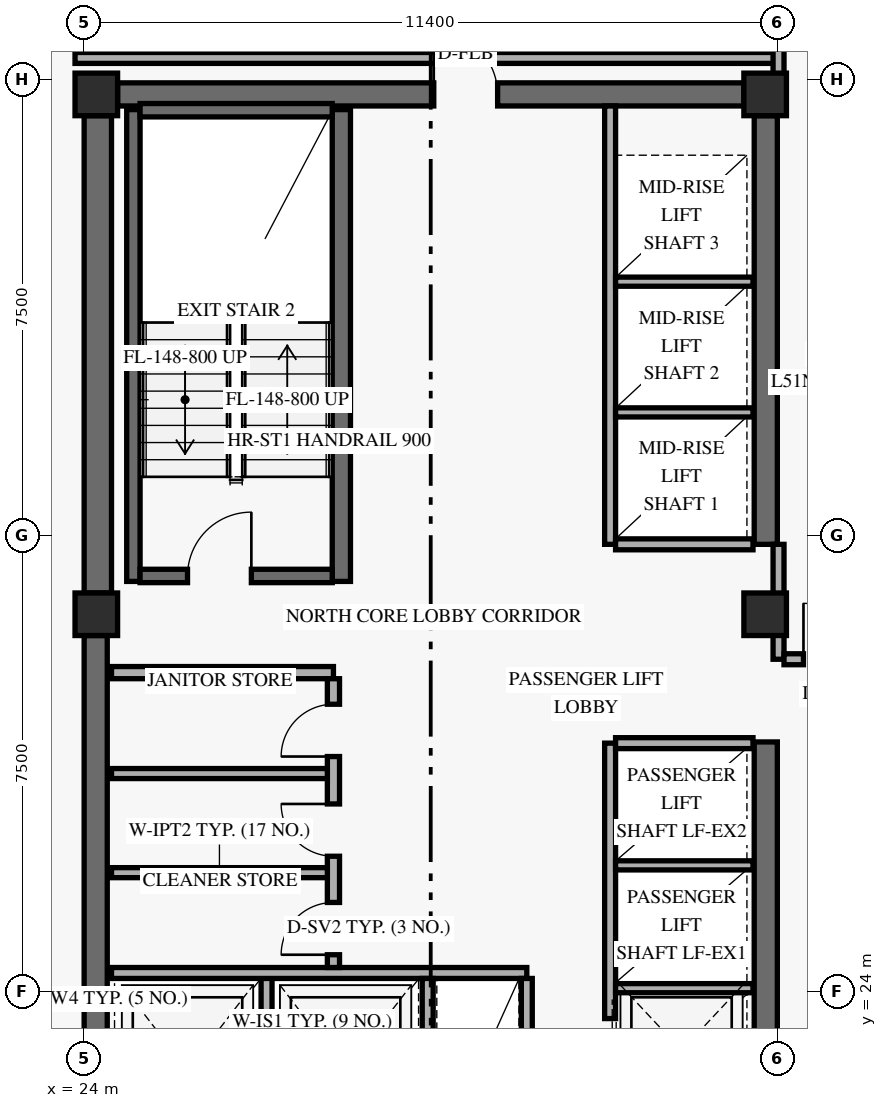
"""IFC4 building model, lengths in metres.
Left out: names, types, materials, properties, quantities, classifications, styles, units other than length and angle.
Written with IfcOpenShell. Run it as: python <this file> out.ifc"""

import sys

from ifc_helpers import new_model, si_unit, direction, frame, frame_2d, origin, origin_2d, place, context, subcontext, project, spatial, rectangle, extrude, element, fill, save


model = new_model("IFC4")
c1 = context("Model", 3, precision=1e-05, world=origin(), true_north=direction((0.0, 1.0)))
c2 = subcontext(c1, "Body", "Model", "MODEL_VIEW")
j1 = project(units=[si_unit("LENGTHUNIT", "METRE"), si_unit("PLANEANGLEUNIT", "RADIAN")], contexts=[c1])
p1 = place(None, origin())
s1 = spatial("IfcSite", under=j1, at=p1, CompositionType="ELEMENT")
p2 = place(p1, origin())
s2 = spatial("IfcBuilding", under=s1, at=p2, CompositionType="ELEMENT")
p3 = place(p2, frame((0.0, 0.0, 196.2)))
s3 = spatial("IfcBuildingStorey", under=s2, at=p3, CompositionType="ELEMENT", Elevation=196.2)
p4 = place(p3, frame((24.19, 17.9, 0.0), z_axis=(0.0, 0.0, 1.0), x_axis=(0.0, 1.0, 0.0)))
e1 = element("IfcWall", 1, at=p4, inside=s3, PredefinedType="SHEAR", context=c2, shape_type="SweptSolid", body=[
    extrude(rectangle(XDim=11.95, YDim=0.38, at=frame_2d((5.975, 0.0))), origin(), (0.0, 0.0, 1.0), 2.688),
])
p5 = place(p3, frame((24.225, 30.55, 0.0), z_axis=(0.0, 0.0, 1.0), x_axis=(0.0, 1.0, 0.0)))
e2 = element("IfcWall", 2, at=p5, inside=s3, PredefinedType="SHEAR", context=c2, shape_type="SweptSolid", body=[
    extrude(rectangle(XDim=7.85, YDim=0.45, at=frame_2d((3.925, 0.0))), origin(), (0.0, 0.0, 1.0), 2.688),
])
p6 = place(p3, frame((35.21, 17.9, 0.0), z_axis=(0.0, 0.0, 1.0), x_axis=(0.0, 1.0, 0.0)))
e3 = element("IfcWall", 3, at=p6, inside=s3, PredefinedType="SHEAR", context=c2, shape_type="SweptSolid", body=[
    extrude(rectangle(XDim=10.2, YDim=0.38, at=frame_2d((5.1, 0.0))), origin(), (0.0, 0.0, 1.0), 2.688),
])
p7 = place(p3, frame((35.21, 31.35, 0.0), z_axis=(0.0, 0.0, 1.0), x_axis=(0.0, 1.0, 0.0)))
e4 = element("IfcWall", 4, at=p7, inside=s3, PredefinedType="SHEAR", context=c2, shape_type="SweptSolid", body=[
    extrude(rectangle(XDim=7.05, YDim=0.38, at=frame_2d((3.525, 0.0))), origin(), (0.0, 0.0, 1.0), 2.688),
])
p8 = place(p3, frame((24.55, 38.75, 0.0), z_axis=(0.0, 0.0, 1.0), x_axis=(1.0, 0.0, 0.0)))
e5 = element("IfcWall", 5, at=p8, inside=s3, PredefinedType="SHEAR", context=c2, shape_type="SweptSolid", body=[
    extrude(rectangle(XDim=10.3, YDim=0.38, at=frame_2d((5.15, 0.0))), origin(), (0.0, 0.0, 1.0), 3.3),
])
p9 = place(p8, frame((5.2, 0.0, 0.0)))
e6 = element("IfcOpeningElement", 6, at=p9, cuts=e5, PredefinedType="OPENING", context=c2, shape_type="SweptSolid", body=[
    extrude(rectangle(XDim=1.05, YDim=2.15, at=frame_2d((0.525, 1.075))), frame((0.0, 0.2, 0.0), z_axis=(0.0, -1.0, 0.0), x_axis=(1.0, 0.0, 0.0)), (0.0, 0.0, 1.0), 0.4),
])
p10 = place(p3, frame((24.81, 30.74, 0.0), z_axis=(0.0, 0.0, 1.0), x_axis=(0.0, 1.0, 0.0)))
e7 = element("IfcWall", 7, at=p10, inside=s3, PredefinedType="SHEAR", context=c2, shape_type="SweptSolid", body=[
    extrude(rectangle(XDim=7.76, YDim=0.22, at=frame_2d((3.88, 0.0))), origin(), (0.0, 0.0, 1.0), 3.3),
])
p11 = place(p3, frame((28.23, 30.74, 0.0), z_axis=(0.0, 0.0, 1.0), x_axis=(0.0, 1.0, 0.0)))
e8 = element("IfcWall", 8, at=p11, inside=s3, PredefinedType="SHEAR", context=c2, shape_type="SweptSolid", body=[
    extrude(rectangle(XDim=7.76, YDim=0.3, at=frame_2d((3.88, 0.0))), origin(), (0.0, 0.0, 1.0), 3.3),
])
p12 = place(p3, frame((24.92, 30.83, 0.0), z_axis=(0.0, 0.0, 1.0), x_axis=(1.0, 0.0, 0.0)))
e9 = element("IfcWall", 9, at=p12, inside=s3, PredefinedType="SHEAR", context=c2, shape_type="SweptSolid", body=[
    extrude(rectangle(XDim=3.16, YDim=0.22, at=frame_2d((1.58, 0.0))), origin(), (0.0, 0.0, 1.0), 3.3),
])
p13 = place(p12, frame((0.78, 0.0, 0.0)))
e10 = element("IfcOpeningElement", 10, at=p13, cuts=e9, PredefinedType="OPENING", context=c2, shape_type="SweptSolid", body=[
    extrude(rectangle(XDim=1.05, YDim=2.15, at=frame_2d((0.525, 1.075))), frame((0.0, 0.12, 0.0), z_axis=(0.0, -1.0, 0.0), x_axis=(1.0, 0.0, 0.0)), (0.0, 0.0, 1.0), 0.24),
])
p14 = place(p3, frame((24.92, 38.49, 0.0), z_axis=(0.0, 0.0, 1.0), x_axis=(1.0, 0.0, 0.0)))
e11 = element("IfcWall", 11, at=p14, inside=s3, PredefinedType="SHEAR", context=c2, shape_type="SweptSolid", body=[
    extrude(rectangle(XDim=3.16, YDim=0.22, at=frame_2d((1.58, 0.0))), origin(), (0.0, 0.0, 1.0), 3.3),
])
for number, where, z_axis, x_axis in (
    (12, (24.2, 30.2, 0.0), (0.0, 0.0, 1.0), (1.0, 0.0, 0.0)),
    (13, (24.2, 38.75, 0.0), (0.0, 0.0, 1.0), (1.0, 0.0, 0.0)),
    (14, (35.2, 30.2, 0.0), (0.0, 0.0, 1.0), (1.0, 0.0, 0.0)),
    (15, (35.2, 38.75, 0.0), (0.0, 0.0, 1.0), (1.0, 0.0, 0.0)),
):
    element("IfcColumn", number, at=place(p3, frame(where, z_axis=z_axis, x_axis=x_axis)), inside=s3, PredefinedType="COLUMN", context=c2, shape_type="SweptSolid", body=[
        extrude(rectangle(XDim=0.7, YDim=0.7, at=origin_2d()), origin(), (0.0, 0.0, 1.0), 3.6),
    ])
p15 = place(p3, frame((27.0, 21.19, 0.0), z_axis=(0.0, 0.0, 1.0), x_axis=(0.0, 1.0, 0.0)))
e16 = element("IfcWall", 16, at=p15, inside=s3, PredefinedType="STANDARD", context=c2, shape_type="SweptSolid", body=[
    extrude(rectangle(XDim=3.11, YDim=0.18, at=frame_2d((1.555, 0.0))), origin(), (0.0, 0.0, 1.0), 3.3),
])
p16 = place(p3, frame((24.45, 24.3, 0.0), z_axis=(0.0, 0.0, 1.0), x_axis=(1.0, 0.0, 0.0)))
e17 = element("IfcWall", 17, at=p16, inside=s3, PredefinedType="STANDARD", context=c2, shape_type="SweptSolid", body=[
    extrude(rectangle(XDim=6.83, YDim=0.18, at=frame_2d((3.415, 0.0))), origin(), (0.0, 0.0, 1.0), 3.3),
])
for number, where, z_axis, x_axis in (
    (18, (29.65, 21.19, 0.0), (0.0, 0.0, 1.0), (0.0, 1.0, 0.0)),
    (19, (31.28, 21.19, 0.0), (0.0, 0.0, 1.0), (0.0, 1.0, 0.0)),
):
    element("IfcWall", number, at=place(p3, frame(where, z_axis=z_axis, x_axis=x_axis)), inside=s3, PredefinedType="STANDARD", context=c2, shape_type="SweptSolid", body=[
        extrude(rectangle(XDim=3.02, YDim=0.18, at=frame_2d((1.51, 0.0))), origin(), (0.0, 0.0, 1.0), 3.3),
    ])
p17 = place(p3, frame((24.45, 29.24, 0.0), z_axis=(0.0, 0.0, 1.0), x_axis=(1.0, 0.0, 0.0)))
e20 = element("IfcWall", 20, at=p17, inside=s3, PredefinedType="STANDARD", context=c2, shape_type="SweptSolid", body=[
    extrude(rectangle(XDim=3.65, YDim=0.2, at=frame_2d((1.825, 0.0))), origin(), (0.0, 0.0, 1.0), 3.3),
])
p18 = place(p3, frame((28.1, 24.39, 0.0), z_axis=(0.0, 0.0, 1.0), x_axis=(0.0, 1.0, 0.0)))
e21 = element("IfcWall", 21, at=p18, inside=s3, PredefinedType="STANDARD", context=c2, shape_type="SweptSolid", body=[
    extrude(rectangle(XDim=4.75, YDim=0.2, at=frame_2d((2.375, 0.0))), origin(), (0.0, 0.0, 1.0), 3.3),
])
p19 = place(p18, frame((0.21, 0.0, 0.0)))
e22 = element("IfcOpeningElement", 22, at=p19, cuts=e21, PredefinedType="OPENING", context=c2, shape_type="SweptSolid", body=[
    extrude(rectangle(XDim=0.86, YDim=2.1, at=frame_2d((0.43, 1.05))), frame((0.0, 0.11, 0.0), z_axis=(0.0, -1.0, 0.0), x_axis=(1.0, 0.0, 0.0)), (0.0, 0.0, 1.0), 0.22),
])
p20 = place(p18, frame((1.83, 0.0, 0.0)))
e23 = element("IfcOpeningElement", 23, at=p20, cuts=e21, PredefinedType="OPENING", context=c2, shape_type="SweptSolid", body=[
    extrude(rectangle(XDim=0.86, YDim=2.1, at=frame_2d((0.43, 1.05))), frame((0.0, 0.11, 0.0), z_axis=(0.0, -1.0, 0.0), x_axis=(1.0, 0.0, 0.0)), (0.0, 0.0, 1.0), 0.22),
])
p21 = place(p18, frame((3.47, 0.0, 0.0)))
e24 = element("IfcOpeningElement", 24, at=p21, cuts=e21, PredefinedType="OPENING", context=c2, shape_type="SweptSolid", body=[
    extrude(rectangle(XDim=0.86, YDim=2.1, at=frame_2d((0.43, 1.05))), frame((0.0, 0.11, 0.0), z_axis=(0.0, -1.0, 0.0), x_axis=(1.0, 0.0, 0.0)), (0.0, 0.0, 1.0), 0.22),
])
for number, where, z_axis, x_axis in (
    (25, (24.45, 25.95, 0.0), (0.0, 0.0, 1.0), (1.0, 0.0, 0.0)),
    (26, (24.45, 27.58, 0.0), (0.0, 0.0, 1.0), (1.0, 0.0, 0.0)),
):
    element("IfcWall", number, at=place(p3, frame(where, z_axis=z_axis, x_axis=x_axis)), inside=s3, PredefinedType="PARTITIONING", context=c2, shape_type="SweptSolid", body=[
        extrude(rectangle(XDim=3.55, YDim=0.165, at=frame_2d((1.775, 0.0))), origin(), (0.0, 0.0, 1.0), 3.3),
    ])
p22 = place(p3, frame((32.65, 18.02, 0.0), z_axis=(0.0, 0.0, 1.0), x_axis=(0.0, 1.0, 0.0)))
e27 = element("IfcWall", 27, at=p22, inside=s3, PredefinedType="STANDARD", context=c2, shape_type="SweptSolid", body=[
    extrude(rectangle(XDim=10.06, YDim=0.18, at=frame_2d((5.03, 0.0))), origin(), (0.0, 0.0, 1.0), 3.3),
])
p23 = place(p22, frame((0.48, 0.0, 0.0)))
e28 = element("IfcOpeningElement", 28, at=p23, cuts=e27, PredefinedType="OPENING", context=c2, shape_type="SweptSolid", body=[
    extrude(rectangle(XDim=1.05, YDim=2.2, at=frame_2d((0.525, 1.1))), frame((0.0, 0.1, 0.0), z_axis=(0.0, -1.0, 0.0), x_axis=(1.0, 0.0, 0.0)), (0.0, 0.0, 1.0), 0.2),
])
p24 = place(p22, frame((2.48, 0.0, 0.0)))
e29 = element("IfcOpeningElement", 29, at=p24, cuts=e27, PredefinedType="OPENING", context=c2, shape_type="SweptSolid", body=[
    extrude(rectangle(XDim=1.05, YDim=2.2, at=frame_2d((0.525, 1.1))), frame((0.0, 0.1, 0.0), z_axis=(0.0, -1.0, 0.0), x_axis=(1.0, 0.0, 0.0)), (0.0, 0.0, 1.0), 0.2),
])
p25 = place(p22, frame((4.48, 0.0, 0.0)))
e30 = element("IfcOpeningElement", 30, at=p25, cuts=e27, PredefinedType="OPENING", context=c2, shape_type="SweptSolid", body=[
    extrude(rectangle(XDim=1.05, YDim=2.2, at=frame_2d((0.525, 1.1))), frame((0.0, 0.1, 0.0), z_axis=(0.0, -1.0, 0.0), x_axis=(1.0, 0.0, 0.0)), (0.0, 0.0, 1.0), 0.2),
])
p26 = place(p3, frame((32.74, 28.08, 0.0), z_axis=(0.0, 0.0, 1.0), x_axis=(1.0, 0.0, 0.0)))
e31 = element("IfcWall", 31, at=p26, inside=s3, PredefinedType="STANDARD", context=c2, shape_type="SweptSolid", body=[
    extrude(rectangle(XDim=2.26, YDim=0.18, at=frame_2d((1.13, 0.0))), origin(), (0.0, 0.0, 1.0), 3.3),
])
for number, where, z_axis, x_axis in (
    (32, (32.74, 24.05, 0.0), (0.0, 0.0, 1.0), (1.0, 0.0, 0.0)),
    (33, (32.74, 26.07, 0.0), (0.0, 0.0, 1.0), (1.0, 0.0, 0.0)),
):
    element("IfcWall", number, at=place(p3, frame(where, z_axis=z_axis, x_axis=x_axis)), inside=s3, PredefinedType="STANDARD", context=c2, shape_type="SweptSolid", body=[
        extrude(rectangle(XDim=2.26, YDim=0.15, at=frame_2d((1.13, 0.0))), origin(), (0.0, 0.0, 1.0), 3.3),
    ])
p27 = place(p3, frame((32.65, 31.35, 0.0), z_axis=(0.0, 0.0, 1.0), x_axis=(0.0, 1.0, 0.0)))
e34 = element("IfcWall", 34, at=p27, inside=s3, PredefinedType="STANDARD", context=c2, shape_type="SweptSolid", body=[
    extrude(rectangle(XDim=7.21, YDim=0.18, at=frame_2d((3.605, 0.0))), origin(), (0.0, 0.0, 1.0), 3.3),
])
p28 = place(p3, frame((32.74, 31.35, 0.0), z_axis=(0.0, 0.0, 1.0), x_axis=(1.0, 0.0, 0.0)))
e35 = element("IfcWall", 35, at=p28, inside=s3, PredefinedType="STANDARD", context=c2, shape_type="SweptSolid", body=[
    extrude(rectangle(XDim=2.26, YDim=0.18, at=frame_2d((1.13, 0.0))), origin(), (0.0, 0.0, 1.0), 3.3),
])
for number, where, z_axis, x_axis in (
    (36, (32.74, 33.52, 0.0), (0.0, 0.0, 1.0), (1.0, 0.0, 0.0)),
    (37, (32.74, 35.67, 0.0), (0.0, 0.0, 1.0), (1.0, 0.0, 0.0)),
):
    element("IfcWall", number, at=place(p3, frame(where, z_axis=z_axis, x_axis=x_axis)), inside=s3, PredefinedType="STANDARD", context=c2, shape_type="SweptSolid", body=[
        extrude(rectangle(XDim=2.26, YDim=0.15, at=frame_2d((1.13, 0.0))), origin(), (0.0, 0.0, 1.0), 3.3),
    ])
p29 = place(p3, frame((35.42, 29.46, 0.0), z_axis=(0.0, 0.0, 1.0), x_axis=(0.0, 1.0, 0.0)))
e38 = element("IfcWall", 38, at=p29, inside=s3, PredefinedType="STANDARD", context=c2, shape_type="SweptSolid", body=[
    extrude(rectangle(XDim=1.89, YDim=0.18, at=frame_2d((0.945, 0.0))), origin(), (0.0, 0.0, 1.0), 2.67),
])
p30 = place(p3, frame((35.51, 29.46, 0.0), z_axis=(0.0, 0.0, 1.0), x_axis=(1.0, 0.0, 0.0)))
e39 = element("IfcWall", 39, at=p30, inside=s3, PredefinedType="STANDARD", context=c2, shape_type="SweptSolid", body=[
    extrude(rectangle(XDim=13.69, YDim=0.18, at=frame_2d((6.845, 0.0))), origin(), (0.0, 0.0, 1.0), 2.67),
])
p31 = place(p30, frame((0.32, 0.0, 0.0)))
e40 = element("IfcOpeningElement", 40, at=p31, cuts=e39, PredefinedType="OPENING", context=c2, shape_type="SweptSolid", body=[
    extrude(rectangle(XDim=0.92, YDim=2.15, at=frame_2d((0.46, 1.075))), frame((0.0, 0.1, 0.0), z_axis=(0.0, -1.0, 0.0), x_axis=(1.0, 0.0, 0.0)), (0.0, 0.0, 1.0), 0.2),
])
p32 = place(p3, frame((23.85, 39.35, 0.0), z_axis=(0.0, 0.0, 1.0), x_axis=(1.0, 0.0, 0.0)))
e41 = element("IfcWall", 41, at=p32, inside=s3, PredefinedType="STANDARD", context=c2, shape_type="SweptSolid", body=[
    extrude(rectangle(XDim=11.57, YDim=0.18, at=frame_2d((5.785, 0.0))), origin(), (0.0, 0.0, 1.0), 2.67),
])
p33 = place(p3, frame((35.42, 38.75, 0.0), z_axis=(0.0, 0.0, 1.0), x_axis=(0.0, 1.0, 0.0)))
e42 = element("IfcWall", 42, at=p33, inside=s3, PredefinedType="PARTITIONING", context=c2, shape_type="SweptSolid", body=[
    extrude(rectangle(XDim=4.97, YDim=0.18, at=frame_2d((2.485, 0.0))), origin(), (0.0, 0.0, 1.0), 2.67),
])
p34 = place(p13, origin())
e43 = element("IfcDoor", 43, at=p34, inside=s3, OperationType="SINGLE_SWING_RIGHT", PredefinedType="DOOR", context=c2, shape_type="SweptSolid", body=[
    extrude(rectangle(XDim=1.05, YDim=2.15, at=frame_2d((0.525, 1.075))), frame((0.0, 0.025, 0.0), z_axis=(0.0, -1.0, 0.0), x_axis=(1.0, 0.0, 0.0)), (0.0, 0.0, 1.0), 0.05),
])
fill(e10, e43)
p35 = place(p19, origin())
e44 = element("IfcDoor", 44, at=p35, inside=s3, OperationType="SINGLE_SWING_LEFT", PredefinedType="DOOR", context=c2, shape_type="SweptSolid", body=[
    extrude(rectangle(XDim=0.86, YDim=2.1, at=frame_2d((0.43, 1.05))), frame((0.0, 0.025, 0.0), z_axis=(0.0, -1.0, 0.0), x_axis=(1.0, 0.0, 0.0)), (0.0, 0.0, 1.0), 0.05),
])
fill(e22, e44)
p36 = place(p20, origin())
e45 = element("IfcDoor", 45, at=p36, inside=s3, OperationType="SINGLE_SWING_RIGHT", PredefinedType="DOOR", context=c2, shape_type="SweptSolid", body=[
    extrude(rectangle(XDim=0.86, YDim=2.1, at=frame_2d((0.43, 1.05))), frame((0.0, 0.025, 0.0), z_axis=(0.0, -1.0, 0.0), x_axis=(1.0, 0.0, 0.0)), (0.0, 0.0, 1.0), 0.05),
])
fill(e23, e45)
p37 = place(p21, origin())
e46 = element("IfcDoor", 46, at=p37, inside=s3, OperationType="SINGLE_SWING_LEFT", PredefinedType="DOOR", context=c2, shape_type="SweptSolid", body=[
    extrude(rectangle(XDim=0.86, YDim=2.1, at=frame_2d((0.43, 1.05))), frame((0.0, 0.025, 0.0), z_axis=(0.0, -1.0, 0.0), x_axis=(1.0, 0.0, 0.0)), (0.0, 0.0, 1.0), 0.05),
])
fill(e24, e46)
p38 = place(p25, origin())
e47 = element("IfcDoor", 47, at=p38, inside=s3, OperationType="SLIDING_TO_LEFT", PredefinedType="DOOR", context=c2, shape_type="SweptSolid", body=[
    extrude(rectangle(XDim=1.05, YDim=2.2, at=frame_2d((0.525, 1.1))), frame((0.0, 0.025, 0.0), z_axis=(0.0, -1.0, 0.0), x_axis=(1.0, 0.0, 0.0)), (0.0, 0.0, 1.0), 0.05),
])
fill(e30, e47)
p39 = place(p9, frame((1.05, 0.0, 0.0), z_axis=(0.0, 0.0, 1.0), x_axis=(-1.0, 0.0, 0.0)))
e48 = element("IfcDoor", 48, at=p39, inside=s3, OperationType="SINGLE_SWING_RIGHT", PredefinedType="DOOR", context=c2, shape_type="SweptSolid", body=[
    extrude(rectangle(XDim=1.05, YDim=2.15, at=frame_2d((0.525, 1.075))), frame((0.0, 0.025, 0.0), z_axis=(0.0, -1.0, 0.0), x_axis=(1.0, 0.0, 0.0)), (0.0, 0.0, 1.0), 0.05),
])
fill(e6, e48)
p40 = place(p31, origin())
e49 = element("IfcDoor", 49, at=p40, inside=s3, OperationType="SINGLE_SWING_LEFT", PredefinedType="DOOR", context=c2, shape_type="SweptSolid", body=[
    extrude(rectangle(XDim=0.92, YDim=2.15, at=frame_2d((0.46, 1.075))), frame((0.0, 0.025, 0.0), z_axis=(0.0, -1.0, 0.0), x_axis=(1.0, 0.0, 0.0)), (0.0, 0.0, 1.0), 0.05),
])
fill(e40, e49)
save(model, sys.argv[1])
